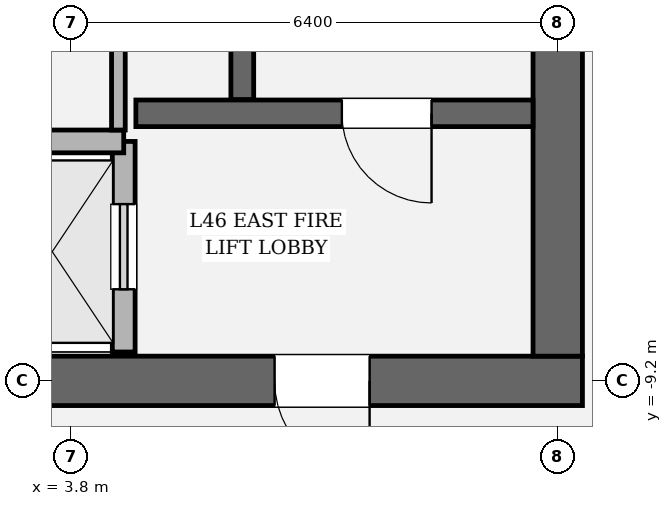
"""IFC4 building model, lengths in metres.
Left out: names, types, materials, properties, quantities, classifications, styles, units other than length and angle.
Written with IfcOpenShell. Run it as: python <this file> out.ifc"""

import sys

from ifc_helpers import new_model, si_unit, direction, frame, frame_2d, origin, place, context, subcontext, project, spatial, rectangle, extrude, element, fill, save


model = new_model("IFC4")
c1 = context("Model", 3, precision=1e-05, world=origin(), true_north=direction((0.0, 1.0)))
c2 = subcontext(c1, "Body", "Model", "MODEL_VIEW")
j1 = project(units=[si_unit("LENGTHUNIT", "METRE"), si_unit("PLANEANGLEUNIT", "RADIAN")], contexts=[c1])
p1 = place(None, origin())
s1 = spatial("IfcSite", under=j1, at=p1, CompositionType="ELEMENT")
p2 = place(p1, origin())
s2 = spatial("IfcBuilding", under=s1, at=p2, CompositionType="ELEMENT")
p3 = place(p2, frame((0.0, 0.0, 196.5)))
s3 = spatial("IfcBuildingStorey", under=s2, at=p3, CompositionType="ELEMENT", Elevation=196.5)
p4 = place(p3, frame((10.525, -9.2, 0.0), z_axis=(0.0, 0.0, 1.0), x_axis=(-1.0, 0.0, 0.0)))
e1 = element("IfcWall", 1, at=p4, inside=s3, PredefinedType="SHEAR", context=c2, shape_type="SweptSolid", body=[
    extrude(rectangle(XDim=21.05, YDim=0.65, at=frame_2d((10.525, 0.0))), origin(), (0.0, 0.0, 1.0), 4.05),
])
p5 = place(p4, frame((2.8, 0.0, 0.0)))
e2 = element("IfcOpeningElement", 2, at=p5, cuts=e1, PredefinedType="OPENING", context=c2, shape_type="SweptSolid", body=[
    extrude(rectangle(XDim=1.25, YDim=2.25, at=frame_2d((0.625, 1.125))), frame((0.0, 0.335, 0.0), z_axis=(0.0, -1.0, 0.0), x_axis=(1.0, 0.0, 0.0)), (0.0, 0.0, 1.0), 0.67),
])
p6 = place(p4, frame((17.0, 0.0, 0.0)))
e3 = element("IfcOpeningElement", 3, at=p6, cuts=e1, PredefinedType="OPENING", context=c2, shape_type="SweptSolid", body=[
    extrude(rectangle(XDim=1.25, YDim=2.25, at=frame_2d((0.625, 1.125))), frame((0.0, 0.335, 0.0), z_axis=(0.0, -1.0, 0.0), x_axis=(1.0, 0.0, 0.0)), (0.0, 0.0, 1.0), 0.67),
])
p7 = place(p3, frame((10.2, 8.875, 0.0), z_axis=(0.0, 0.0, 1.0), x_axis=(0.0, -1.0, 0.0)))
e4 = element("IfcWall", 4, at=p7, inside=s3, PredefinedType="SHEAR", context=c2, shape_type="SweptSolid", body=[
    extrude(rectangle(XDim=17.75, YDim=0.65, at=frame_2d((8.875, 0.0))), origin(), (0.0, 0.0, 1.0), 4.05),
])
p8 = place(p7, frame((3.905, 0.0, 0.0)))
e5 = element("IfcOpeningElement", 5, at=p8, cuts=e4, PredefinedType="OPENING", context=c2, shape_type="SweptSolid", body=[
    extrude(rectangle(XDim=1.18, YDim=2.2, at=frame_2d((0.59, 1.1))), frame((0.0, 0.335, 0.0), z_axis=(0.0, -1.0, 0.0), x_axis=(1.0, 0.0, 0.0)), (0.0, 0.0, 1.0), 0.67),
])
p9 = place(p3, frame((6.05, 3.45, 0.0), z_axis=(0.0, 0.0, 1.0), x_axis=(0.0, -1.0, 0.0)))
e6 = element("IfcWall", 6, at=p9, inside=s3, PredefinedType="SOLIDWALL", context=c2, shape_type="SweptSolid", body=[
    extrude(rectangle(XDim=8.95, YDim=0.3, at=frame_2d((4.475, 0.0))), origin(), (0.0, 0.0, 1.0), 4.05),
])
p10 = place(p3, frame((4.65, -5.68, 0.0), z_axis=(0.0, 0.0, 1.0), x_axis=(1.0, 0.0, 0.0)))
e7 = element("IfcWall", 7, at=p10, inside=s3, PredefinedType="SOLIDWALL", context=c2, shape_type="SweptSolid", body=[
    extrude(rectangle(XDim=5.225, YDim=0.35, at=frame_2d((2.613, 0.0))), origin(), (0.0, 0.0, 1.0), 4.05),
])
p11 = place(p10, frame((2.71, 0.0, 0.0)))
e8 = element("IfcOpeningElement", 8, at=p11, cuts=e7, PredefinedType="OPENING", context=c2, shape_type="SweptSolid", body=[
    extrude(rectangle(XDim=1.18, YDim=2.2, at=frame_2d((0.59, 1.1))), frame((0.0, 0.185, 0.0), z_axis=(0.0, -1.0, 0.0), x_axis=(1.0, 0.0, 0.0)), (0.0, 0.0, 1.0), 0.37),
])
p12 = place(p3, frame((4.49, -8.82, 0.0), z_axis=(0.0, 0.0, 1.0), x_axis=(0.0, 1.0, 0.0)))
e9 = element("IfcWall", 9, at=p12, inside=s3, PredefinedType="SOLIDWALL", context=c2, shape_type="SweptSolid", body=[
    extrude(rectangle(XDim=2.77, YDim=0.3, at=frame_2d((1.385, 0.0))), origin(), (0.0, 0.0, 1.0), 3.83),
])
p13 = place(p12, frame((0.825, 0.0, 0.0)))
e10 = element("IfcOpeningElement", 10, at=p13, cuts=e9, PredefinedType="OPENING", context=c2, shape_type="SweptSolid", body=[
    extrude(rectangle(XDim=1.12, YDim=2.25, at=frame_2d((0.56, 1.125))), frame((0.0, 0.16, 0.0), z_axis=(0.0, -1.0, 0.0), x_axis=(1.0, 0.0, 0.0)), (0.0, 0.0, 1.0), 0.32),
])
p14 = place(p3, frame((2.61, -6.05, 0.0), z_axis=(0.0, 0.0, 1.0), x_axis=(1.0, 0.0, 0.0)))
e11 = element("IfcWall", 11, at=p14, inside=s3, PredefinedType="SOLIDWALL", context=c2, shape_type="SweptSolid", body=[
    extrude(rectangle(XDim=1.88, YDim=0.3, at=frame_2d((0.94, 0.0))), origin(), (0.0, 0.0, 1.0), 3.83),
])
p15 = place(p3, frame((4.42, -5.9, 0.0), z_axis=(0.0, 0.0, 1.0), x_axis=(0.0, 1.0, 0.0)))
e12 = element("IfcWall", 12, at=p15, inside=s3, PredefinedType="PARTITIONING", context=c2, shape_type="SweptSolid", body=[
    extrude(rectangle(XDim=1.74, YDim=0.18, at=frame_2d((0.87, 0.0))), origin(), (0.0, 0.0, 1.0), 3.83),
])
p16 = place(p11, origin())
e13 = element("IfcDoor", 13, at=p16, inside=s3, OperationType="SINGLE_SWING_RIGHT", PredefinedType="DOOR", context=c2, shape_type="SweptSolid", body=[
    extrude(rectangle(XDim=1.18, YDim=2.2, at=frame_2d((0.59, 1.1))), frame((0.0, 0.025, 0.0), z_axis=(0.0, -1.0, 0.0), x_axis=(1.0, 0.0, 0.0)), (0.0, 0.0, 1.0), 0.05),
])
fill(e8, e13)
p17 = place(p5, origin())
e14 = element("IfcDoor", 14, at=p17, inside=s3, OperationType="SINGLE_SWING_LEFT", PredefinedType="DOOR", context=c2, shape_type="SweptSolid", body=[
    extrude(rectangle(XDim=1.25, YDim=2.25, at=frame_2d((0.625, 1.125))), frame((0.0, 0.025, 0.0), z_axis=(0.0, -1.0, 0.0), x_axis=(1.0, 0.0, 0.0)), (0.0, 0.0, 1.0), 0.05),
])
fill(e2, e14)
p18 = place(p13, origin())
e15 = element("IfcDoor", 15, at=p18, inside=s3, OperationType="SLIDING_TO_RIGHT", PredefinedType="DOOR", context=c2, shape_type="SweptSolid", body=[
    extrude(rectangle(XDim=1.12, YDim=2.25, at=frame_2d((0.56, 1.125))), frame((0.0, 0.025, 0.0), z_axis=(0.0, -1.0, 0.0), x_axis=(1.0, 0.0, 0.0)), (0.0, 0.0, 1.0), 0.05),
])
fill(e10, e15)
save(model, sys.argv[1])
